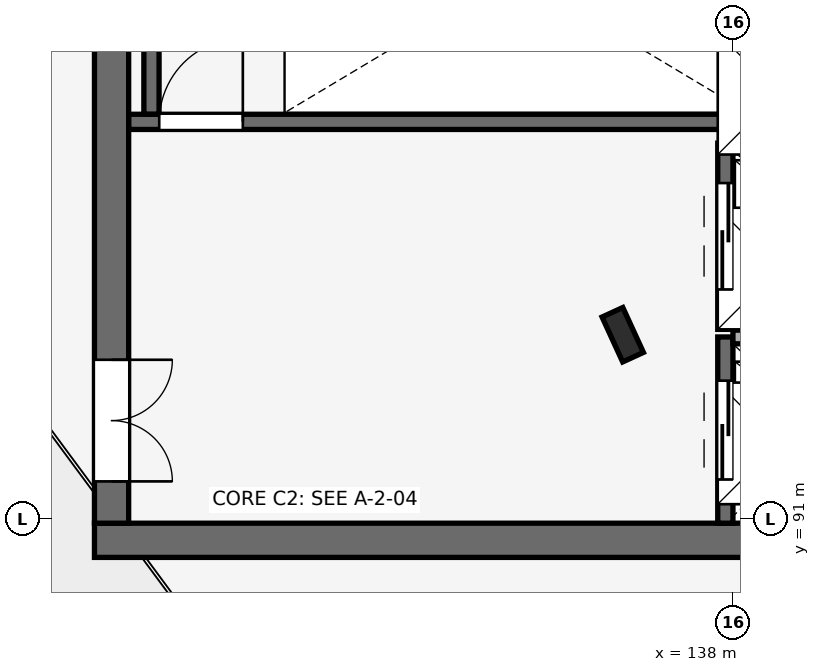
"""IFC4 building model, lengths in metres.
Left out: names, types, materials, properties, quantities, classifications, styles, units other than length and angle.
Written with IfcOpenShell. Run it as: python <this file> out.ifc"""

import sys

from ifc_helpers import new_model, si_unit, direction, frame, frame_2d, origin, origin_2d, place, context, subcontext, project, spatial, rectangle, i_section, extrude, element, fill, save


model = new_model("IFC4")
c1 = context("Model", 3, precision=1e-05, world=origin(), true_north=direction((0.0, 1.0)))
c2 = subcontext(c1, "Body", "Model", "MODEL_VIEW")
j1 = project(units=[si_unit("LENGTHUNIT", "METRE"), si_unit("PLANEANGLEUNIT", "RADIAN")], contexts=[c1])
p1 = place(None, origin())
s1 = spatial("IfcSite", under=j1, at=p1, CompositionType="ELEMENT")
p2 = place(p1, origin())
s2 = spatial("IfcBuilding", under=s1, at=p2, CompositionType="ELEMENT")
p3 = place(p2, frame((0.0, 0.0, 24.0)))
s3 = spatial("IfcBuildingStorey", under=s2, at=p3, CompositionType="ELEMENT", Elevation=24.0)
p4 = place(p3, frame((136.55, 93.43, 0.0), z_axis=(0.0, 0.0, 1.0), x_axis=(0.909018020308, 0.416756810089, 0.0)))
e1 = element("IfcColumn", 1, at=p4, inside=s3, PredefinedType="COLUMN", context=c2, shape_type="SweptSolid", body=[
    extrude(i_section(OverallWidth=0.3, OverallDepth=0.65, WebThickness=0.016, FlangeThickness=0.031, FilletRadius=0.027, at=origin_2d()), origin(), (0.0, 0.0, 1.0), 3.4),
])
p5 = place(p3, frame((129.6, 90.725, 0.0), z_axis=(0.0, 0.0, 1.0), x_axis=(1.0, 0.0, 0.0)))
e2 = element("IfcWall", 2, at=p5, inside=s3, PredefinedType="SHEAR", context=c2, shape_type="SweptSolid", body=[
    extrude(rectangle(XDim=11.4, YDim=0.45, at=frame_2d((5.7, 0.0))), origin(), (0.0, 0.0, 1.0), 4.8),
])
p6 = place(p3, frame((129.825, 90.95, 0.0), z_axis=(0.0, 0.0, 1.0), x_axis=(0.0, 1.0, 0.0)))
e3 = element("IfcWall", 3, at=p6, inside=s3, PredefinedType="SHEAR", context=c2, shape_type="SweptSolid", body=[
    extrude(rectangle(XDim=9.1, YDim=0.45, at=frame_2d((4.55, 0.0))), origin(), (0.0, 0.0, 1.0), 4.8),
])
p7 = place(p6, frame((0.55, 0.0, 0.0)))
e4 = element("IfcOpeningElement", 4, at=p7, cuts=e3, PredefinedType="OPENING", context=c2, shape_type="SweptSolid", body=[
    extrude(rectangle(XDim=1.6, YDim=2.2, at=frame_2d((0.8, 1.1))), frame((0.0, 0.235, 0.0), z_axis=(0.0, -1.0, 0.0), x_axis=(1.0, 0.0, 0.0)), (0.0, 0.0, 1.0), 0.47),
])
p8 = place(p3, frame((138.129, 90.0, 0.0), z_axis=(0.0, 0.0, 1.0), x_axis=(0.418086422493, -0.908407256316, 0.0)))
e5 = element("IfcWall", 5, at=p8, inside=s3, PredefinedType="STANDARD", context=c2, shape_type="SweptSolid", body=[
    extrude(rectangle(XDim=3.076, YDim=0.32, at=frame_2d((1.538, 0.0))), origin(), (0.0, 0.0, 1.0), 3.38),
])
p9 = place(p3, frame((137.9, 90.95, 0.0), z_axis=(0.0, 0.0, 1.0), x_axis=(0.0, 1.0, 0.0)))
e6 = element("IfcWall", 6, at=p9, inside=s3, PredefinedType="SHEAR", context=c2, shape_type="SweptSolid", body=[
    extrude(rectangle(XDim=2.45, YDim=0.2, at=frame_2d((1.225, 0.0))), origin(), (0.0, 0.0, 1.0), 3.38),
])
p10 = place(p9, frame((0.575, 0.0, 0.0)))
e7 = element("IfcOpeningElement", 7, at=p10, cuts=e6, PredefinedType="OPENING", context=c2, shape_type="SweptSolid", body=[
    extrude(rectangle(XDim=1.3, YDim=2.2, at=frame_2d((0.65, 1.1))), frame((0.0, 0.11, 0.0), z_axis=(0.0, -1.0, 0.0), x_axis=(1.0, 0.0, 0.0)), (0.0, 0.0, 1.0), 0.22),
])
p11 = place(p3, frame((138.0, 93.4, 0.0), z_axis=(0.0, 0.0, 1.0), x_axis=(1.0, 0.0, 0.0)))
e8 = element("IfcWall", 8, at=p11, inside=s3, PredefinedType="PARTITIONING", context=c2, shape_type="SweptSolid", body=[
    extrude(rectangle(XDim=2.45, YDim=0.18, at=frame_2d((1.225, 0.0))), origin(), (0.0, 0.0, 1.0), 4.8),
])
p12 = place(p3, frame((137.9, 93.5, 0.0), z_axis=(0.0, 0.0, 1.0), x_axis=(0.0, 1.0, 0.0)))
e9 = element("IfcWall", 9, at=p12, inside=s3, PredefinedType="SHEAR", context=c2, shape_type="SweptSolid", body=[
    extrude(rectangle(XDim=2.45, YDim=0.2, at=frame_2d((1.225, 0.0))), origin(), (0.0, 0.0, 1.0), 3.38),
])
p13 = place(p12, frame((0.525, 0.0, 0.0)))
e10 = element("IfcOpeningElement", 10, at=p13, cuts=e9, PredefinedType="OPENING", context=c2, shape_type="SweptSolid", body=[
    extrude(rectangle(XDim=1.4, YDim=2.2, at=frame_2d((0.7, 1.1))), frame((0.0, 0.11, 0.0), z_axis=(0.0, -1.0, 0.0), x_axis=(1.0, 0.0, 0.0)), (0.0, 0.0, 1.0), 0.22),
])
p14 = place(p3, frame((138.0, 95.95, 0.0), z_axis=(0.0, 0.0, 1.0), x_axis=(1.0, 0.0, 0.0)))
e11 = element("IfcWall", 11, at=p14, inside=s3, PredefinedType="PARTITIONING", context=c2, shape_type="SweptSolid", body=[
    extrude(rectangle(XDim=2.45, YDim=0.18, at=frame_2d((1.225, 0.0))), origin(), (0.0, 0.0, 1.0), 4.8),
])
p15 = place(p3, frame((130.052, 96.23, 0.0), z_axis=(0.0, 0.0, 1.0), x_axis=(1.0, 0.0, 0.0)))
e12 = element("IfcWall", 12, at=p15, inside=s3, PredefinedType="SHEAR", context=c2, shape_type="SweptSolid", body=[
    extrude(rectangle(XDim=8.248, YDim=0.2, at=frame_2d((4.124, 0.0))), origin(), (0.0, 0.0, 1.0), 4.8),
])
p16 = place(p15, frame((0.4, 0.0, 0.0)))
e13 = element("IfcOpeningElement", 13, at=p16, cuts=e12, PredefinedType="OPENING", context=c2, shape_type="SweptSolid", body=[
    extrude(rectangle(XDim=1.1, YDim=2.15, at=frame_2d((0.55, 1.075))), frame((0.0, 0.11, 0.0), z_axis=(0.0, -1.0, 0.0), x_axis=(1.0, 0.0, 0.0)), (0.0, 0.0, 1.0), 0.22),
])
p17 = place(p3, frame((130.35, 96.332, 0.0), z_axis=(0.0, 0.0, 1.0), x_axis=(0.0, 1.0, 0.0)))
e14 = element("IfcWall", 14, at=p17, inside=s3, PredefinedType="SHEAR", context=c2, shape_type="SweptSolid", body=[
    extrude(rectangle(XDim=3.686, YDim=0.2, at=frame_2d((1.843, 0.0))), origin(), (0.0, 0.0, 1.0), 4.8),
])
p18 = place(p2, frame((0.0, 0.0, 28.8)))
p19 = place(p18, frame((138.803, 94.452, 0.0)))
p20 = place(p19, frame((-0.203, -2.452, -0.01)))
p21 = place(p20, frame((0.0, 0.0, 0.14)))
e15 = element("IfcWindow", 15, at=p21, inside=s3, PartitioningType="SINGLE_PANEL", PredefinedType="SKYLIGHT", context=c2, shape_type="SweptSolid", body=[
    extrude(rectangle(XDim=1.6, YDim=1.6, at=origin_2d()), origin(), (0.0, 0.0, 1.0), 0.05),
])
p22 = place(p19, frame((-0.203, -0.152, -0.01)))
p23 = place(p22, frame((0.0, 0.0, 0.14)))
e16 = element("IfcWindow", 16, at=p23, inside=s3, PartitioningType="SINGLE_PANEL", PredefinedType="SKYLIGHT", context=c2, shape_type="SweptSolid", body=[
    extrude(rectangle(XDim=1.6, YDim=1.6, at=origin_2d()), origin(), (0.0, 0.0, 1.0), 0.05),
])
p24 = place(p19, frame((-0.203, 2.148, -0.01)))
p25 = place(p24, frame((0.0, 0.0, 0.14)))
e17 = element("IfcWindow", 17, at=p25, inside=s3, PartitioningType="SINGLE_PANEL", PredefinedType="SKYLIGHT", context=c2, shape_type="SweptSolid", body=[
    extrude(rectangle(XDim=1.6, YDim=1.6, at=origin_2d()), origin(), (0.0, 0.0, 1.0), 0.05),
])
p26 = place(p10, origin())
e18 = element("IfcDoor", 18, at=p26, inside=s3, OperationType="DOUBLE_DOOR_SLIDING", PredefinedType="DOOR", context=c2, shape_type="SweptSolid", body=[
    extrude(rectangle(XDim=1.3, YDim=2.2, at=frame_2d((0.65, 1.1))), frame((0.0, 0.025, 0.0), z_axis=(0.0, -1.0, 0.0), x_axis=(1.0, 0.0, 0.0)), (0.0, 0.0, 1.0), 0.05),
])
fill(e7, e18)
p27 = place(p13, origin())
e19 = element("IfcDoor", 19, at=p27, inside=s3, OperationType="DOUBLE_DOOR_SLIDING", PredefinedType="DOOR", context=c2, shape_type="SweptSolid", body=[
    extrude(rectangle(XDim=1.4, YDim=2.2, at=frame_2d((0.7, 1.1))), frame((0.0, 0.025, 0.0), z_axis=(0.0, -1.0, 0.0), x_axis=(1.0, 0.0, 0.0)), (0.0, 0.0, 1.0), 0.05),
])
fill(e10, e19)
p28 = place(p16, frame((1.1, 0.0, 0.0), z_axis=(0.0, 0.0, 1.0), x_axis=(-1.0, 0.0, 0.0)))
e20 = element("IfcDoor", 20, at=p28, inside=s3, OperationType="SINGLE_SWING_LEFT", PredefinedType="DOOR", context=c2, shape_type="SweptSolid", body=[
    extrude(rectangle(XDim=1.1, YDim=2.15, at=frame_2d((0.55, 1.075))), frame((0.0, 0.025, 0.0), z_axis=(0.0, -1.0, 0.0), x_axis=(1.0, 0.0, 0.0)), (0.0, 0.0, 1.0), 0.05),
])
fill(e13, e20)
p29 = place(p7, frame((1.6, 0.0, 0.0), z_axis=(0.0, 0.0, 1.0), x_axis=(-1.0, 0.0, 0.0)))
e21 = element("IfcDoor", 21, at=p29, inside=s3, OperationType="DOUBLE_DOOR_SINGLE_SWING", PredefinedType="DOOR", context=c2, shape_type="SweptSolid", body=[
    extrude(rectangle(XDim=1.6, YDim=2.2, at=frame_2d((0.8, 1.1))), frame((0.0, 0.025, 0.0), z_axis=(0.0, -1.0, 0.0), x_axis=(1.0, 0.0, 0.0)), (0.0, 0.0, 1.0), 0.05),
])
fill(e4, e21)
save(model, sys.argv[1])
